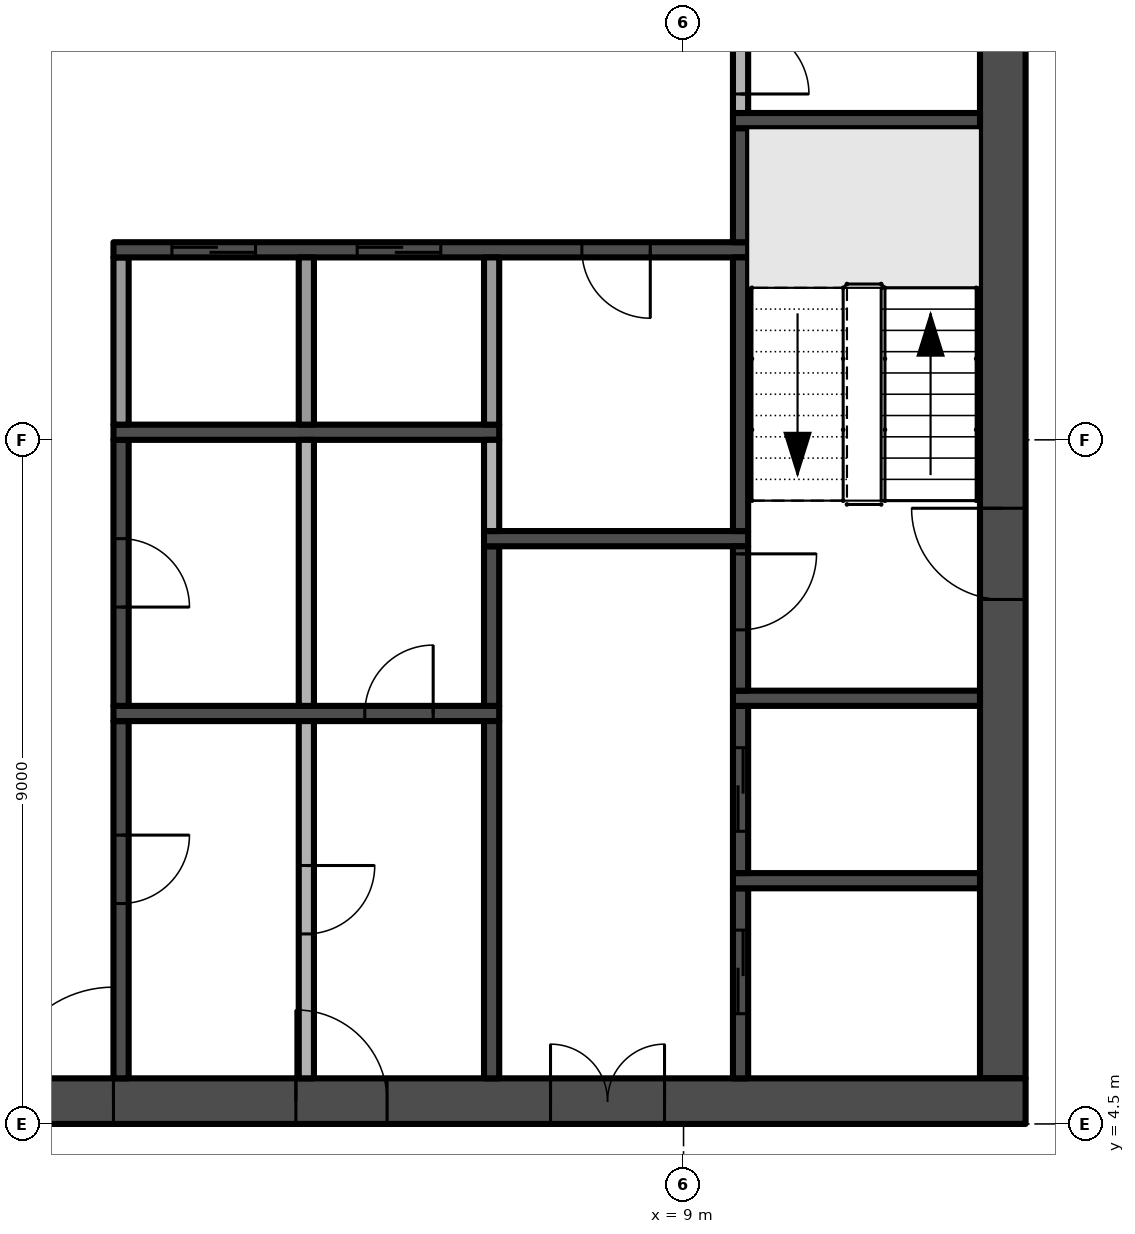
"""IFC4 building model, lengths in metres.
Left out: names, types, materials, properties, quantities, classifications, styles, units other than length and angle.
Written with IfcOpenShell. Run it as: python <this file> out.ifc"""

import sys

from ifc_helpers import new_model, si_unit, direction, frame, frame_2d, origin, place, context, subcontext, project, spatial, rectangle, extrude, element, fill, save


model = new_model("IFC4")
c1 = context("Model", 3, precision=1e-05, world=origin(), true_north=direction((0.0, 1.0)))
c2 = subcontext(c1, "Body", "Model", "MODEL_VIEW")
j1 = project(units=[si_unit("LENGTHUNIT", "METRE"), si_unit("PLANEANGLEUNIT", "RADIAN")], contexts=[c1])
p1 = place(None, origin())
s1 = spatial("IfcSite", under=j1, at=p1, CompositionType="ELEMENT")
p2 = place(p1, origin())
s2 = spatial("IfcBuilding", under=s1, at=p2, CompositionType="ELEMENT")
p3 = place(p2, frame((0.0, 0.0, 250.2)))
s3 = spatial("IfcBuildingStorey", under=s2, at=p3, CompositionType="ELEMENT", Elevation=250.2)
p4 = place(p3, frame((-13.5, 4.8, -0.3), z_axis=(0.0, 0.0, 1.0), x_axis=(1.0, 0.0, 0.0)))
e1 = element("IfcWall", 1, at=p4, inside=s3, PredefinedType="SHEAR", context=c2, shape_type="SweptSolid", body=[
    extrude(rectangle(XDim=27.0, YDim=0.6, at=frame_2d((13.5, 0.0))), origin(), (0.0, 0.0, 1.0), 3.8),
])
p5 = place(p4, frame((12.0, 0.0, 0.3)))
e2 = element("IfcOpeningElement", 2, at=p5, cuts=e1, PredefinedType="OPENING", context=c2, shape_type="SweptSolid", body=[
    extrude(rectangle(XDim=3.0, YDim=2.4, at=frame_2d((1.5, 1.2))), frame((0.0, 0.31, 0.0), z_axis=(0.0, -1.0, 0.0), x_axis=(1.0, 0.0, 0.0)), (0.0, 0.0, 1.0), 0.62),
])
p6 = place(p4, frame((4.9, 0.0, 0.3)))
e3 = element("IfcOpeningElement", 3, at=p6, cuts=e1, PredefinedType="OPENING", context=c2, shape_type="SweptSolid", body=[
    extrude(rectangle(XDim=1.2, YDim=2.2, at=frame_2d((0.6, 1.1))), frame((0.0, 0.31, 0.0), z_axis=(0.0, -1.0, 0.0), x_axis=(1.0, 0.0, 0.0)), (0.0, 0.0, 1.0), 0.62),
])
p7 = place(p4, frame((20.75, 0.0, 0.3)))
e4 = element("IfcOpeningElement", 4, at=p7, cuts=e1, PredefinedType="OPENING", context=c2, shape_type="SweptSolid", body=[
    extrude(rectangle(XDim=1.5, YDim=2.2, at=frame_2d((0.75, 1.1))), frame((0.0, 0.31, 0.0), z_axis=(0.0, -1.0, 0.0), x_axis=(1.0, 0.0, 0.0)), (0.0, 0.0, 1.0), 0.62),
])
p8 = place(p4, frame((17.4, 0.0, 0.3)))
e5 = element("IfcOpeningElement", 5, at=p8, cuts=e1, PredefinedType="OPENING", context=c2, shape_type="SweptSolid", body=[
    extrude(rectangle(XDim=1.2, YDim=2.2, at=frame_2d((0.6, 1.1))), frame((0.0, 0.31, 0.0), z_axis=(0.0, -1.0, 0.0), x_axis=(1.0, 0.0, 0.0)), (0.0, 0.0, 1.0), 0.62),
])
p9 = place(p3, frame((13.2, 5.1, -0.3), z_axis=(0.0, 0.0, 1.0), x_axis=(0.0, 1.0, 0.0)))
e6 = element("IfcWall", 6, at=p9, inside=s3, PredefinedType="SHEAR", context=c2, shape_type="SweptSolid", body=[
    extrude(rectangle(XDim=16.8, YDim=0.6, at=frame_2d((8.4, 0.0))), origin(), (0.0, 0.0, 1.0), 3.8),
])
p10 = place(p9, frame((6.3, 0.0, 0.3)))
e7 = element("IfcOpeningElement", 7, at=p10, cuts=e6, PredefinedType="OPENING", context=c2, shape_type="SweptSolid", body=[
    extrude(rectangle(XDim=1.2, YDim=2.2, at=frame_2d((0.6, 1.1))), frame((0.0, 0.31, 0.0), z_axis=(0.0, -1.0, 0.0), x_axis=(1.0, 0.0, 0.0)), (0.0, 0.0, 1.0), 0.62),
])
p11 = place(p3, frame((1.6, 9.8, 0.0), z_axis=(0.0, 0.0, 1.0), x_axis=(0.0, -1.0, 0.0)))
e8 = element("IfcWall", 8, at=p11, inside=s3, PredefinedType="SHEAR", context=c2, shape_type="SweptSolid", body=[
    extrude(rectangle(XDim=4.7, YDim=0.2, at=frame_2d((2.35, 0.0))), origin(), (0.0, 0.0, 1.0), 3.5),
])
p12 = place(p11, frame((1.5, 0.0, 0.0)))
e9 = element("IfcOpeningElement", 9, at=p12, cuts=e8, PredefinedType="OPENING", context=c2, shape_type="SweptSolid", body=[
    extrude(rectangle(XDim=0.9, YDim=2.1, at=frame_2d((0.45, 1.05))), frame((0.0, 0.11, 0.0), z_axis=(0.0, -1.0, 0.0), x_axis=(1.0, 0.0, 0.0)), (0.0, 0.0, 1.0), 0.22),
])
p13 = place(p3, frame((1.5, 9.9, 0.0), z_axis=(0.0, 0.0, 1.0), x_axis=(1.0, 0.0, 0.0)))
e10 = element("IfcWall", 10, at=p13, inside=s3, PredefinedType="SHEAR", context=c2, shape_type="SweptSolid", body=[
    extrude(rectangle(XDim=5.075, YDim=0.2, at=frame_2d((2.538, 0.0))), origin(), (0.0, 0.0, 1.0), 3.5),
])
p14 = place(p13, frame((3.306, 0.0, 0.0)))
e11 = element("IfcOpeningElement", 11, at=p14, cuts=e10, PredefinedType="OPENING", context=c2, shape_type="SweptSolid", body=[
    extrude(rectangle(XDim=0.9, YDim=2.1, at=frame_2d((0.45, 1.05))), frame((0.0, 0.11, 0.0), z_axis=(0.0, -1.0, 0.0), x_axis=(1.0, 0.0, 0.0)), (0.0, 0.0, 1.0), 0.22),
])
p15 = place(p3, frame((1.6, 13.5, 0.0), z_axis=(0.0, 0.0, 1.0), x_axis=(0.0, -1.0, 0.0)))
e12 = element("IfcWall", 12, at=p15, inside=s3, PredefinedType="SHEAR", context=c2, shape_type="SweptSolid", body=[
    extrude(rectangle(XDim=3.5, YDim=0.2, at=frame_2d((1.75, 0.0))), origin(), (0.0, 0.0, 1.0), 3.5),
])
p16 = place(p15, frame((1.3, 0.0, 0.0)))
e13 = element("IfcOpeningElement", 13, at=p16, cuts=e12, PredefinedType="OPENING", context=c2, shape_type="SweptSolid", body=[
    extrude(rectangle(XDim=0.9, YDim=2.1, at=frame_2d((0.45, 1.05))), frame((0.0, 0.11, 0.0), z_axis=(0.0, -1.0, 0.0), x_axis=(1.0, 0.0, 0.0)), (0.0, 0.0, 1.0), 0.22),
])
p17 = place(p3, frame((1.5, 13.6, 0.0), z_axis=(0.0, 0.0, 1.0), x_axis=(1.0, 0.0, 0.0)))
e14 = element("IfcWall", 14, at=p17, inside=s3, PredefinedType="SHEAR", context=c2, shape_type="SweptSolid", body=[
    extrude(rectangle(XDim=5.075, YDim=0.2, at=frame_2d((2.538, 0.0))), origin(), (0.0, 0.0, 1.0), 3.5),
])
p18 = place(p3, frame((1.6, 13.7, 0.0), z_axis=(0.0, 0.0, 1.0), x_axis=(0.0, 1.0, 0.0)))
e15 = element("IfcWall", 15, at=p18, inside=s3, PredefinedType="PARTITIONING", context=c2, shape_type="SweptSolid", body=[
    extrude(rectangle(XDim=2.2, YDim=0.2, at=frame_2d((1.1, 0.0))), origin(), (0.0, 0.0, 1.0), 3.5),
])
p19 = place(p3, frame((9.85, 16.0, 0.0), z_axis=(0.0, 0.0, 1.0), x_axis=(-1.0, 0.0, 0.0)))
e16 = element("IfcWall", 16, at=p19, inside=s3, PredefinedType="SHEAR", context=c2, shape_type="SweptSolid", body=[
    extrude(rectangle(XDim=8.35, YDim=0.2, at=frame_2d((4.175, 0.0))), origin(), (0.0, 0.0, 1.0), 3.5),
])
p20 = place(p19, frame((6.481, 0.0, 0.0)))
e17 = element("IfcOpeningElement", 17, at=p20, cuts=e16, PredefinedType="OPENING", context=c2, shape_type="SweptSolid", body=[
    extrude(rectangle(XDim=1.1, YDim=2.1, at=frame_2d((0.55, 1.05))), frame((0.0, 0.11, 0.0), z_axis=(0.0, -1.0, 0.0), x_axis=(1.0, 0.0, 0.0)), (0.0, 0.0, 1.0), 0.22),
])
p21 = place(p19, frame((4.044, 0.0, 0.0)))
e18 = element("IfcOpeningElement", 18, at=p21, cuts=e16, PredefinedType="OPENING", context=c2, shape_type="SweptSolid", body=[
    extrude(rectangle(XDim=1.1, YDim=2.1, at=frame_2d((0.55, 1.05))), frame((0.0, 0.11, 0.0), z_axis=(0.0, -1.0, 0.0), x_axis=(1.0, 0.0, 0.0)), (0.0, 0.0, 1.0), 0.22),
])
p22 = place(p19, frame((1.288, 0.0, 0.0)))
e19 = element("IfcOpeningElement", 19, at=p22, cuts=e16, PredefinedType="OPENING", context=c2, shape_type="SweptSolid", body=[
    extrude(rectangle(XDim=0.9, YDim=2.1, at=frame_2d((0.45, 1.05))), frame((0.0, 0.11, 0.0), z_axis=(0.0, -1.0, 0.0), x_axis=(1.0, 0.0, 0.0)), (0.0, 0.0, 1.0), 0.22),
])
p23 = place(p3, frame((4.037, 9.8, 0.0), z_axis=(0.0, 0.0, 1.0), x_axis=(0.0, -1.0, 0.0)))
e20 = element("IfcWall", 20, at=p23, inside=s3, PredefinedType="PARTITIONING", context=c2, shape_type="SweptSolid", body=[
    extrude(rectangle(XDim=4.7, YDim=0.2, at=frame_2d((2.35, 0.0))), origin(), (0.0, 0.0, 1.0), 3.5),
])
p24 = place(p23, frame((1.9, 0.0, 0.0)))
e21 = element("IfcOpeningElement", 21, at=p24, cuts=e20, PredefinedType="OPENING", context=c2, shape_type="SweptSolid", body=[
    extrude(rectangle(XDim=0.9, YDim=2.1, at=frame_2d((0.45, 1.05))), frame((0.0, 0.11, 0.0), z_axis=(0.0, -1.0, 0.0), x_axis=(1.0, 0.0, 0.0)), (0.0, 0.0, 1.0), 0.22),
])
p25 = place(p3, frame((4.037, 10.0, 0.0), z_axis=(0.0, 0.0, 1.0), x_axis=(0.0, 1.0, 0.0)))
e22 = element("IfcWall", 22, at=p25, inside=s3, PredefinedType="PARTITIONING", context=c2, shape_type="SweptSolid", body=[
    extrude(rectangle(XDim=3.5, YDim=0.2, at=frame_2d((1.75, 0.0))), origin(), (0.0, 0.0, 1.0), 3.5),
])
p26 = place(p3, frame((4.037, 13.7, 0.0), z_axis=(0.0, 0.0, 1.0), x_axis=(0.0, 1.0, 0.0)))
e23 = element("IfcWall", 23, at=p26, inside=s3, PredefinedType="PARTITIONING", context=c2, shape_type="SweptSolid", body=[
    extrude(rectangle(XDim=2.2, YDim=0.2, at=frame_2d((1.1, 0.0))), origin(), (0.0, 0.0, 1.0), 3.5),
])
p27 = place(p3, frame((6.475, 5.1, 0.0), z_axis=(0.0, 0.0, 1.0), x_axis=(0.0, 1.0, 0.0)))
e24 = element("IfcWall", 24, at=p27, inside=s3, PredefinedType="SHEAR", context=c2, shape_type="SweptSolid", body=[
    extrude(rectangle(XDim=4.7, YDim=0.2, at=frame_2d((2.35, 0.0))), origin(), (0.0, 0.0, 1.0), 3.5),
])
p28 = place(p3, frame((6.475, 10.0, 0.0), z_axis=(0.0, 0.0, 1.0), x_axis=(0.0, 1.0, 0.0)))
e25 = element("IfcWall", 25, at=p28, inside=s3, PredefinedType="SHEAR", context=c2, shape_type="SweptSolid", body=[
    extrude(rectangle(XDim=2.1, YDim=0.2, at=frame_2d((1.05, 0.0))), origin(), (0.0, 0.0, 1.0), 3.5),
])
p29 = place(p3, frame((6.375, 12.2, 0.0), z_axis=(0.0, 0.0, 1.0), x_axis=(1.0, 0.0, 0.0)))
e26 = element("IfcWall", 26, at=p29, inside=s3, PredefinedType="SHEAR", context=c2, shape_type="SweptSolid", body=[
    extrude(rectangle(XDim=3.475, YDim=0.2, at=frame_2d((1.738, 0.0))), origin(), (0.0, 0.0, 1.0), 3.5),
])
p30 = place(p3, frame((6.475, 12.3, 0.0), z_axis=(0.0, 0.0, 1.0), x_axis=(0.0, 1.0, 0.0)))
e27 = element("IfcWall", 27, at=p30, inside=s3, PredefinedType="PARTITIONING", context=c2, shape_type="SweptSolid", body=[
    extrude(rectangle(XDim=1.2, YDim=0.2, at=frame_2d((0.6, 0.0))), origin(), (0.0, 0.0, 1.0), 3.5),
])
p31 = place(p3, frame((6.475, 13.7, 0.0), z_axis=(0.0, 0.0, 1.0), x_axis=(0.0, 1.0, 0.0)))
e28 = element("IfcWall", 28, at=p31, inside=s3, PredefinedType="PARTITIONING", context=c2, shape_type="SweptSolid", body=[
    extrude(rectangle(XDim=2.2, YDim=0.2, at=frame_2d((1.1, 0.0))), origin(), (0.0, 0.0, 1.0), 3.5),
])
p32 = place(p3, frame((9.75, 5.1, 0.0), z_axis=(0.0, 0.0, 1.0), x_axis=(0.0, 1.0, 0.0)))
e29 = element("IfcWall", 29, at=p32, inside=s3, PredefinedType="SHEAR", context=c2, shape_type="SweptSolid", body=[
    extrude(rectangle(XDim=2.5, YDim=0.2, at=frame_2d((1.25, 0.0))), origin(), (0.0, 0.0, 1.0), 3.5),
])
p33 = place(p32, frame((0.85, 0.0, 0.0)))
e30 = element("IfcOpeningElement", 30, at=p33, cuts=e29, PredefinedType="OPENING", context=c2, shape_type="SweptSolid", body=[
    extrude(rectangle(XDim=1.1, YDim=2.1, at=frame_2d((0.55, 1.05))), frame((0.0, 0.11, 0.0), z_axis=(0.0, -1.0, 0.0), x_axis=(1.0, 0.0, 0.0)), (0.0, 0.0, 1.0), 0.22),
])
p34 = place(p3, frame((9.65, 7.7, 0.0), z_axis=(0.0, 0.0, 1.0), x_axis=(1.0, 0.0, 0.0)))
e31 = element("IfcWall", 31, at=p34, inside=s3, PredefinedType="SHEAR", context=c2, shape_type="SweptSolid", body=[
    extrude(rectangle(XDim=3.25, YDim=0.2, at=frame_2d((1.625, 0.0))), origin(), (0.0, 0.0, 1.0), 3.5),
])
p35 = place(p3, frame((9.75, 7.8, 0.0), z_axis=(0.0, 0.0, 1.0), x_axis=(0.0, 1.0, 0.0)))
e32 = element("IfcWall", 32, at=p35, inside=s3, PredefinedType="SHEAR", context=c2, shape_type="SweptSolid", body=[
    extrude(rectangle(XDim=2.2, YDim=0.2, at=frame_2d((1.1, 0.0))), origin(), (0.0, 0.0, 1.0), 3.5),
])
p36 = place(p35, frame((0.55, 0.0, 0.0)))
e33 = element("IfcOpeningElement", 33, at=p36, cuts=e32, PredefinedType="OPENING", context=c2, shape_type="SweptSolid", body=[
    extrude(rectangle(XDim=1.1, YDim=2.1, at=frame_2d((0.55, 1.05))), frame((0.0, 0.11, 0.0), z_axis=(0.0, -1.0, 0.0), x_axis=(1.0, 0.0, 0.0)), (0.0, 0.0, 1.0), 0.22),
])
p37 = place(p3, frame((9.65, 10.1, 0.0), z_axis=(0.0, 0.0, 1.0), x_axis=(1.0, 0.0, 0.0)))
e34 = element("IfcWall", 34, at=p37, inside=s3, PredefinedType="SHEAR", context=c2, shape_type="SweptSolid", body=[
    extrude(rectangle(XDim=3.25, YDim=0.2, at=frame_2d((1.625, 0.0))), origin(), (0.0, 0.0, 1.0), 3.5),
])
p38 = place(p3, frame((9.75, 12.1, 0.0), z_axis=(0.0, 0.0, 1.0), x_axis=(0.0, -1.0, 0.0)))
e35 = element("IfcWall", 35, at=p38, inside=s3, PredefinedType="SHEAR", context=c2, shape_type="SweptSolid", body=[
    extrude(rectangle(XDim=1.9, YDim=0.2, at=frame_2d((0.95, 0.0))), origin(), (0.0, 0.0, 1.0), 3.5),
])
p39 = place(p38, frame((0.1, 0.0, 0.0)))
e36 = element("IfcOpeningElement", 36, at=p39, cuts=e35, PredefinedType="OPENING", context=c2, shape_type="SweptSolid", body=[
    extrude(rectangle(XDim=1.0, YDim=2.2, at=frame_2d((0.5, 1.1))), frame((0.0, 0.11, 0.0), z_axis=(0.0, -1.0, 0.0), x_axis=(1.0, 0.0, 0.0)), (0.0, 0.0, 1.0), 0.22),
])
p40 = place(p3, frame((9.75, 12.3, 0.0), z_axis=(0.0, 0.0, 1.0), x_axis=(0.0, 1.0, 0.0)))
e37 = element("IfcWall", 37, at=p40, inside=s3, PredefinedType="SHEAR", context=c2, shape_type="SweptSolid", body=[
    extrude(rectangle(XDim=3.6, YDim=0.2, at=frame_2d((1.8, 0.0))), origin(), (0.0, 0.0, 1.0), 3.5),
])
p41 = place(p3, frame((9.75, 16.1, 0.0), z_axis=(0.0, 0.0, 1.0), x_axis=(0.0, 1.0, 0.0)))
e38 = element("IfcWall", 38, at=p41, inside=s3, PredefinedType="SHEAR", context=c2, shape_type="SweptSolid", body=[
    extrude(rectangle(XDim=1.5, YDim=0.2, at=frame_2d((0.75, 0.0))), origin(), (0.0, 0.0, 1.0), 3.5),
])
p42 = place(p3, frame((9.65, 17.7, 0.0), z_axis=(0.0, 0.0, 1.0), x_axis=(1.0, 0.0, 0.0)))
e39 = element("IfcWall", 39, at=p42, inside=s3, PredefinedType="SHEAR", context=c2, shape_type="SweptSolid", body=[
    extrude(rectangle(XDim=3.25, YDim=0.2, at=frame_2d((1.625, 0.0))), origin(), (0.0, 0.0, 1.0), 3.5),
])
p43 = place(p3, frame((9.75, 19.2, 0.0), z_axis=(0.0, 0.0, 1.0), x_axis=(0.0, -1.0, 0.0)))
e40 = element("IfcWall", 40, at=p43, inside=s3, PredefinedType="PARTITIONING", context=c2, shape_type="SweptSolid", body=[
    extrude(rectangle(XDim=1.4, YDim=0.2, at=frame_2d((0.7, 0.0))), origin(), (0.0, 0.0, 1.0), 3.5),
])
p44 = place(p43, frame((0.25, 0.0, 0.0)))
e41 = element("IfcOpeningElement", 41, at=p44, cuts=e40, PredefinedType="OPENING", context=c2, shape_type="SweptSolid", body=[
    extrude(rectangle(XDim=0.9, YDim=2.1, at=frame_2d((0.45, 1.05))), frame((0.0, 0.11, 0.0), z_axis=(0.0, -1.0, 0.0), x_axis=(1.0, 0.0, 0.0)), (0.0, 0.0, 1.0), 0.22),
])
p45 = place(p5, frame((3.0, 0.0, 0.0), z_axis=(0.0, 0.0, 1.0), x_axis=(-1.0, 0.0, 0.0)))
e42 = element("IfcDoor", 42, at=p45, inside=s3, OperationType="DOUBLE_DOOR_SINGLE_SWING", PredefinedType="DOOR", context=c2, shape_type="SweptSolid", body=[
    extrude(rectangle(XDim=3.0, YDim=2.4, at=frame_2d((1.5, 1.2))), frame((0.0, 0.025, 0.0), z_axis=(0.0, -1.0, 0.0), x_axis=(1.0, 0.0, 0.0)), (0.0, 0.0, 1.0), 0.05),
])
fill(e2, e42)
p46 = place(p10, frame((1.2, 0.0, 0.0), z_axis=(0.0, 0.0, 1.0), x_axis=(-1.0, 0.0, 0.0)))
e43 = element("IfcDoor", 43, at=p46, inside=s3, OperationType="SINGLE_SWING_LEFT", PredefinedType="DOOR", context=c2, shape_type="SweptSolid", body=[
    extrude(rectangle(XDim=1.2, YDim=2.2, at=frame_2d((0.6, 1.1))), frame((0.0, 0.025, 0.0), z_axis=(0.0, -1.0, 0.0), x_axis=(1.0, 0.0, 0.0)), (0.0, 0.0, 1.0), 0.05),
])
fill(e7, e43)
p47 = place(p7, frame((1.5, 0.0, 0.0), z_axis=(0.0, 0.0, 1.0), x_axis=(-1.0, 0.0, 0.0)))
e44 = element("IfcDoor", 44, at=p47, inside=s3, OperationType="DOUBLE_DOOR_SINGLE_SWING", PredefinedType="DOOR", context=c2, shape_type="SweptSolid", body=[
    extrude(rectangle(XDim=1.5, YDim=2.2, at=frame_2d((0.75, 1.1))), frame((0.0, 0.025, 0.0), z_axis=(0.0, -1.0, 0.0), x_axis=(1.0, 0.0, 0.0)), (0.0, 0.0, 1.0), 0.05),
])
fill(e4, e44)
p48 = place(p8, frame((1.2, 0.0, 0.0), z_axis=(0.0, 0.0, 1.0), x_axis=(-1.0, 0.0, 0.0)))
e45 = element("IfcDoor", 45, at=p48, inside=s3, OperationType="SINGLE_SWING_RIGHT", PredefinedType="DOOR", context=c2, shape_type="SweptSolid", body=[
    extrude(rectangle(XDim=1.2, YDim=2.2, at=frame_2d((0.6, 1.1))), frame((0.0, 0.025, 0.0), z_axis=(0.0, -1.0, 0.0), x_axis=(1.0, 0.0, 0.0)), (0.0, 0.0, 1.0), 0.05),
])
fill(e5, e45)
p49 = place(p39, origin())
e46 = element("IfcDoor", 46, at=p49, inside=s3, OperationType="SINGLE_SWING_LEFT", PredefinedType="DOOR", context=c2, shape_type="SweptSolid", body=[
    extrude(rectangle(XDim=1.0, YDim=2.2, at=frame_2d((0.5, 1.1))), frame((0.0, 0.025, 0.0), z_axis=(0.0, -1.0, 0.0), x_axis=(1.0, 0.0, 0.0)), (0.0, 0.0, 1.0), 0.05),
])
fill(e36, e46)
p50 = place(p20, origin())
e47 = element("IfcDoor", 47, at=p50, inside=s3, OperationType="SLIDING_TO_RIGHT", PredefinedType="DOOR", context=c2, shape_type="SweptSolid", body=[
    extrude(rectangle(XDim=1.1, YDim=2.1, at=frame_2d((0.55, 1.05))), frame((0.0, 0.025, 0.0), z_axis=(0.0, -1.0, 0.0), x_axis=(1.0, 0.0, 0.0)), (0.0, 0.0, 1.0), 0.05),
])
fill(e17, e47)
p51 = place(p21, origin())
e48 = element("IfcDoor", 48, at=p51, inside=s3, OperationType="SLIDING_TO_RIGHT", PredefinedType="DOOR", context=c2, shape_type="SweptSolid", body=[
    extrude(rectangle(XDim=1.1, YDim=2.1, at=frame_2d((0.55, 1.05))), frame((0.0, 0.025, 0.0), z_axis=(0.0, -1.0, 0.0), x_axis=(1.0, 0.0, 0.0)), (0.0, 0.0, 1.0), 0.05),
])
fill(e18, e48)
p52 = place(p33, origin())
e49 = element("IfcDoor", 49, at=p52, inside=s3, OperationType="SLIDING_TO_RIGHT", PredefinedType="DOOR", context=c2, shape_type="SweptSolid", body=[
    extrude(rectangle(XDim=1.1, YDim=2.1, at=frame_2d((0.55, 1.05))), frame((0.0, 0.025, 0.0), z_axis=(0.0, -1.0, 0.0), x_axis=(1.0, 0.0, 0.0)), (0.0, 0.0, 1.0), 0.05),
])
fill(e30, e49)
p53 = place(p36, origin())
e50 = element("IfcDoor", 50, at=p53, inside=s3, OperationType="SLIDING_TO_RIGHT", PredefinedType="DOOR", context=c2, shape_type="SweptSolid", body=[
    extrude(rectangle(XDim=1.1, YDim=2.1, at=frame_2d((0.55, 1.05))), frame((0.0, 0.025, 0.0), z_axis=(0.0, -1.0, 0.0), x_axis=(1.0, 0.0, 0.0)), (0.0, 0.0, 1.0), 0.05),
])
fill(e33, e50)
p54 = place(p12, origin())
e51 = element("IfcDoor", 51, at=p54, inside=s3, OperationType="SINGLE_SWING_LEFT", PredefinedType="DOOR", context=c2, shape_type="SweptSolid", body=[
    extrude(rectangle(XDim=0.9, YDim=2.1, at=frame_2d((0.45, 1.05))), frame((0.0, 0.025, 0.0), z_axis=(0.0, -1.0, 0.0), x_axis=(1.0, 0.0, 0.0)), (0.0, 0.0, 1.0), 0.05),
])
fill(e9, e51)
p55 = place(p24, origin())
e52 = element("IfcDoor", 52, at=p55, inside=s3, OperationType="SINGLE_SWING_LEFT", PredefinedType="DOOR", context=c2, shape_type="SweptSolid", body=[
    extrude(rectangle(XDim=0.9, YDim=2.1, at=frame_2d((0.45, 1.05))), frame((0.0, 0.025, 0.0), z_axis=(0.0, -1.0, 0.0), x_axis=(1.0, 0.0, 0.0)), (0.0, 0.0, 1.0), 0.05),
])
fill(e21, e52)
p56 = place(p16, origin())
e53 = element("IfcDoor", 53, at=p56, inside=s3, OperationType="SINGLE_SWING_RIGHT", PredefinedType="DOOR", context=c2, shape_type="SweptSolid", body=[
    extrude(rectangle(XDim=0.9, YDim=2.1, at=frame_2d((0.45, 1.05))), frame((0.0, 0.025, 0.0), z_axis=(0.0, -1.0, 0.0), x_axis=(1.0, 0.0, 0.0)), (0.0, 0.0, 1.0), 0.05),
])
fill(e13, e53)
p57 = place(p14, origin())
e54 = element("IfcDoor", 54, at=p57, inside=s3, OperationType="SINGLE_SWING_RIGHT", PredefinedType="DOOR", context=c2, shape_type="SweptSolid", body=[
    extrude(rectangle(XDim=0.9, YDim=2.1, at=frame_2d((0.45, 1.05))), frame((0.0, 0.025, 0.0), z_axis=(0.0, -1.0, 0.0), x_axis=(1.0, 0.0, 0.0)), (0.0, 0.0, 1.0), 0.05),
])
fill(e11, e54)
p58 = place(p22, origin())
e55 = element("IfcDoor", 55, at=p58, inside=s3, OperationType="SINGLE_SWING_LEFT", PredefinedType="DOOR", context=c2, shape_type="SweptSolid", body=[
    extrude(rectangle(XDim=0.9, YDim=2.1, at=frame_2d((0.45, 1.05))), frame((0.0, 0.025, 0.0), z_axis=(0.0, -1.0, 0.0), x_axis=(1.0, 0.0, 0.0)), (0.0, 0.0, 1.0), 0.05),
])
fill(e19, e55)
p59 = place(p44, origin())
e56 = element("IfcDoor", 56, at=p59, inside=s3, OperationType="SINGLE_SWING_RIGHT", PredefinedType="DOOR", context=c2, shape_type="SweptSolid", body=[
    extrude(rectangle(XDim=0.9, YDim=2.1, at=frame_2d((0.45, 1.05))), frame((0.0, 0.025, 0.0), z_axis=(0.0, -1.0, 0.0), x_axis=(1.0, 0.0, 0.0)), (0.0, 0.0, 1.0), 0.05),
])
fill(e41, e56)
save(model, sys.argv[1])
